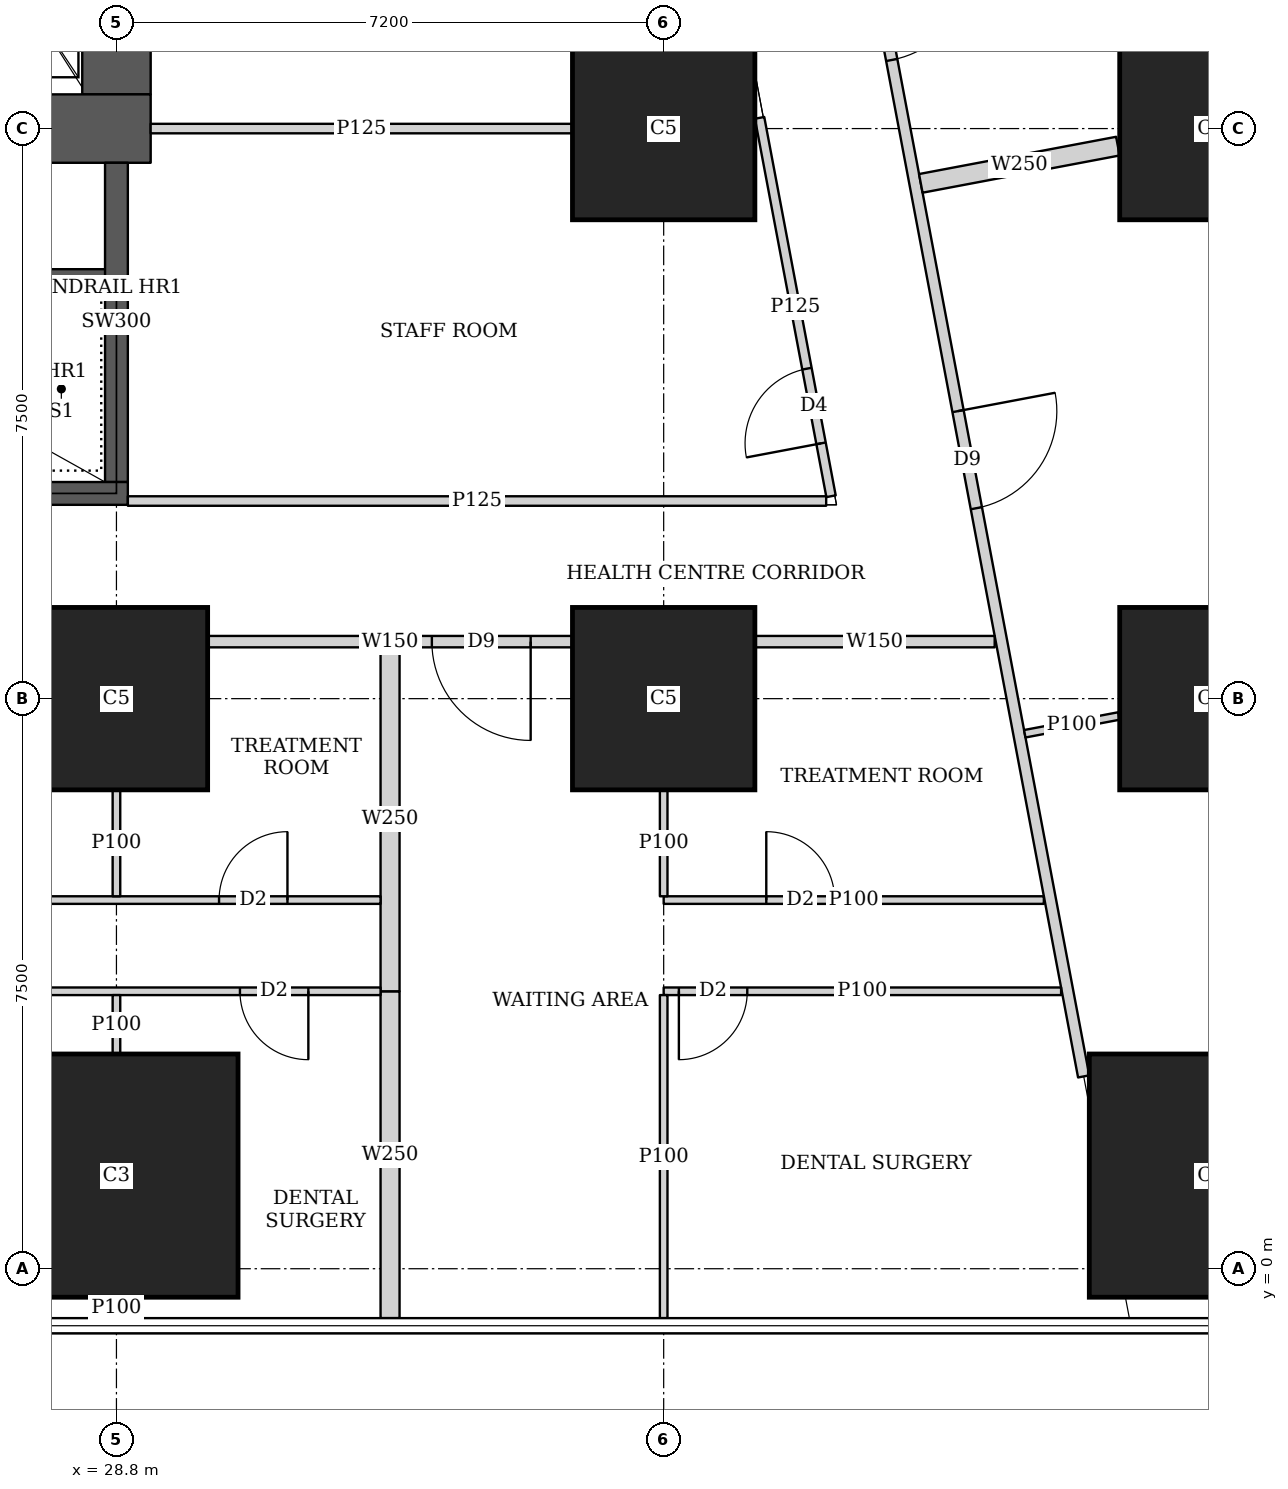
"""IFC4 building model, lengths in metres.
Left out: names, types, materials, properties, quantities, classifications, styles, units other than length and angle.
Written with IfcOpenShell. Run it as: python <this file> out.ifc"""

import sys

from ifc_helpers import new_model, si_unit, direction, frame, frame_2d, origin, origin_2d, place, context, subcontext, project, spatial, rectangle, extrude, element, fill, save


model = new_model("IFC4")
c1 = context("Model", 3, precision=1e-05, world=origin(), true_north=direction((0.0, 1.0)))
c2 = subcontext(c1, "Body", "Model", "MODEL_VIEW")
j1 = project(units=[si_unit("LENGTHUNIT", "METRE"), si_unit("PLANEANGLEUNIT", "RADIAN")], contexts=[c1])
p1 = place(None, origin())
s1 = spatial("IfcSite", under=j1, at=p1, CompositionType="ELEMENT")
p2 = place(p1, origin())
s2 = spatial("IfcBuilding", under=s1, at=p2, CompositionType="ELEMENT")
p3 = place(p2, frame((0.0, 0.0, 10.1)))
s3 = spatial("IfcBuildingStorey", under=s2, at=p3, CompositionType="ELEMENT", Elevation=10.1)
for number, where, z_axis, x_axis in (
    (1, (28.8, 1.225, 0.0), (0.0, 0.0, 1.0), (1.0, 0.0, 0.0)),
    (2, (43.2, 1.225, 0.0), (0.0, 0.0, 1.0), (1.0, 0.0, 0.0)),
):
    element("IfcColumn", number, at=place(p3, frame(where, z_axis=z_axis, x_axis=x_axis)), inside=s3, PredefinedType="COLUMN", context=c2, shape_type="SweptSolid", body=[
        extrude(rectangle(XDim=3.2, YDim=3.2, at=origin_2d()), origin(), (0.0, 0.0, 1.0), 4.5),
    ])
for number, where, z_axis, x_axis in (
    (3, (28.8, 7.5, 0.0), (0.0, 0.0, 1.0), (1.0, 0.0, 0.0)),
    (4, (36.0, 7.5, 0.0), (0.0, 0.0, 1.0), (1.0, 0.0, 0.0)),
    (5, (43.2, 7.5, 0.0), (0.0, 0.0, 1.0), (1.0, 0.0, 0.0)),
    (6, (36.0, 15.0, 0.0), (0.0, 0.0, 1.0), (1.0, 0.0, 0.0)),
    (7, (43.2, 15.0, 0.0), (0.0, 0.0, 1.0), (1.0, 0.0, 0.0)),
):
    element("IfcColumn", number, at=place(p3, frame(where, z_axis=z_axis, x_axis=x_axis)), inside=s3, PredefinedType="COLUMN", context=c2, shape_type="SweptSolid", body=[
        extrude(rectangle(XDim=2.4, YDim=2.4, at=origin_2d()), origin(), (0.0, 0.0, 1.0), 4.5),
    ])
p4 = place(p3, frame((13.95, 15.0, 0.0), z_axis=(0.0, 0.0, 1.0), x_axis=(1.0, 0.0, 0.0)))
e8 = element("IfcWall", 8, at=p4, inside=s3, PredefinedType="SHEAR", context=c2, shape_type="SweptSolid", body=[
    extrude(rectangle(XDim=15.3, YDim=0.9, at=frame_2d((7.65, 0.0))), origin(), (0.0, 0.0, 1.0), 4.5),
])
p5 = place(p4, frame((4.45, 0.0, 0.0)))
e9 = element("IfcOpeningElement", 9, at=p5, cuts=e8, PredefinedType="OPENING", context=c2, shape_type="SweptSolid", body=[
    extrude(rectangle(XDim=1.8, YDim=2.1, at=frame_2d((0.9, 1.05))), frame((0.0, 0.46, 0.0), z_axis=(0.0, -1.0, 0.0), x_axis=(1.0, 0.0, 0.0)), (0.0, 0.0, 1.0), 0.92),
])
p6 = place(p4, frame((10.7, 0.0, 0.0)))
e10 = element("IfcOpeningElement", 10, at=p6, cuts=e8, PredefinedType="OPENING", context=c2, shape_type="SweptSolid", body=[
    extrude(rectangle(XDim=1.1, YDim=2.1, at=frame_2d((0.55, 1.05))), frame((0.0, 0.46, 0.0), z_axis=(0.0, -1.0, 0.0), x_axis=(1.0, 0.0, 0.0)), (0.0, 0.0, 1.0), 0.92),
])
p7 = place(p3, frame((28.8, 15.45, 0.0), z_axis=(0.0, 0.0, 1.0), x_axis=(0.0, 1.0, 0.0)))
e11 = element("IfcWall", 11, at=p7, inside=s3, PredefinedType="SHEAR", context=c2, shape_type="SweptSolid", body=[
    extrude(rectangle(XDim=14.1, YDim=0.9, at=frame_2d((7.05, 0.0))), origin(), (0.0, 0.0, 1.0), 4.5),
])
p8 = place(p3, frame((21.45, 10.2, 0.0), z_axis=(0.0, 0.0, 1.0), x_axis=(1.0, 0.0, 0.0)))
e12 = element("IfcWall", 12, at=p8, inside=s3, PredefinedType="SHEAR", context=c2, shape_type="SweptSolid", body=[
    extrude(rectangle(XDim=7.5, YDim=0.3, at=frame_2d((3.75, 0.0))), origin(), (0.0, 0.0, 1.0), 4.5),
])
p9 = place(p8, frame((0.5, 0.0, 0.0)))
e13 = element("IfcOpeningElement", 13, at=p9, cuts=e12, PredefinedType="OPENING", context=c2, shape_type="SweptSolid", body=[
    extrude(rectangle(XDim=1.1, YDim=2.1, at=frame_2d((0.55, 1.05))), frame((0.0, 0.16, 0.0), z_axis=(0.0, -1.0, 0.0), x_axis=(1.0, 0.0, 0.0)), (0.0, 0.0, 1.0), 0.32),
])
p10 = place(p3, frame((28.8, 10.35, 0.0), z_axis=(0.0, 0.0, 1.0), x_axis=(0.0, 1.0, 0.0)))
e14 = element("IfcWall", 14, at=p10, inside=s3, PredefinedType="SHEAR", context=c2, shape_type="SweptSolid", body=[
    extrude(rectangle(XDim=4.2, YDim=0.3, at=frame_2d((2.1, 0.0))), origin(), (0.0, 0.0, 1.0), 4.5),
])
p11 = place(p3, frame((40.355, 8.25, 0.0), z_axis=(0.0, 0.0, 1.0), x_axis=(-1.0, 0.0, 0.0)))
e15 = element("IfcWall", 15, at=p11, inside=s3, PredefinedType="SOLIDWALL", context=c2, shape_type="SweptSolid", body=[
    extrude(rectangle(XDim=3.154, YDim=0.15, at=frame_2d((1.577, 0.0))), origin(), (0.0, 0.0, 1.0), 2.6),
])
p12 = place(p3, frame((34.799, 8.25, 0.0), z_axis=(0.0, 0.0, 1.0), x_axis=(-1.0, 0.0, 0.0)))
e16 = element("IfcWall", 16, at=p12, inside=s3, PredefinedType="SOLIDWALL", context=c2, shape_type="SweptSolid", body=[
    extrude(rectangle(XDim=4.798, YDim=0.15, at=frame_2d((2.399, 0.0))), origin(), (0.0, 0.0, 1.0), 2.6),
])
p13 = place(p12, frame((0.549, 0.0, 0.0)))
e17 = element("IfcOpeningElement", 17, at=p13, cuts=e16, PredefinedType="OPENING", context=c2, shape_type="SweptSolid", body=[
    extrude(rectangle(XDim=1.3, YDim=2.1, at=frame_2d((0.65, 1.05))), frame((0.0, 0.085, 0.0), z_axis=(0.0, -1.0, 0.0), x_axis=(1.0, 0.0, 0.0)), (0.0, 0.0, 1.0), 0.17),
])
p14 = place(p3, frame((35.151, 36.285, 0.0), z_axis=(0.0, 0.0, 1.0), x_axis=(0.18558085056, -0.982628998099, 0.0)))
e18 = element("IfcWall", 18, at=p14, inside=s3, PredefinedType="SOLIDWALL", context=c2, shape_type="SweptSolid", body=[
    extrude(rectangle(XDim=34.352, YDim=0.15, at=frame_2d((17.176, 0.0))), origin(), (0.0, 0.0, 1.0), 2.4),
])
p15 = place(p14, frame((13.189, 0.0, 0.0)))
e19 = element("IfcOpeningElement", 19, at=p15, cuts=e18, PredefinedType="OPENING", context=c2, shape_type="SweptSolid", body=[
    extrude(rectangle(XDim=1.3, YDim=2.1, at=frame_2d((0.65, 1.05))), frame((0.0, 0.085, 0.0), z_axis=(0.0, -1.0, 0.0), x_axis=(1.0, 0.0, 0.0)), (0.0, 0.0, 1.0), 0.17),
])
p16 = place(p14, frame((19.443, 0.0, 0.0)))
e20 = element("IfcOpeningElement", 20, at=p16, cuts=e18, PredefinedType="OPENING", context=c2, shape_type="SweptSolid", body=[
    extrude(rectangle(XDim=1.3, YDim=2.1, at=frame_2d((0.65, 1.05))), frame((0.0, 0.085, 0.0), z_axis=(0.0, -1.0, 0.0), x_axis=(1.0, 0.0, 0.0)), (0.0, 0.0, 1.0), 0.17),
])
p17 = place(p14, frame((25.444, 0.0, 0.0)))
e21 = element("IfcOpeningElement", 21, at=p17, cuts=e18, PredefinedType="OPENING", context=c2, shape_type="SweptSolid", body=[
    extrude(rectangle(XDim=1.3, YDim=2.1, at=frame_2d((0.65, 1.05))), frame((0.0, 0.085, 0.0), z_axis=(0.0, -1.0, 0.0), x_axis=(1.0, 0.0, 0.0)), (0.0, 0.0, 1.0), 0.17),
])
p18 = place(p3, frame((32.275, 3.65, 0.0), z_axis=(0.0, 0.0, 1.0), x_axis=(-1.0, 0.0, 0.0)))
e22 = element("IfcWall", 22, at=p18, inside=s3, PredefinedType="PARTITIONING", context=c2, shape_type="SweptSolid", body=[
    extrude(rectangle(XDim=10.675, YDim=0.1, at=frame_2d((5.337, 0.0))), origin(), (0.0, 0.0, 1.0), 2.6),
])
p19 = place(p18, frame((9.575, 0.0, 0.0)))
e23 = element("IfcOpeningElement", 23, at=p19, cuts=e22, PredefinedType="OPENING", context=c2, shape_type="SweptSolid", body=[
    extrude(rectangle(XDim=0.9, YDim=2.1, at=frame_2d((0.45, 1.05))), frame((0.0, 0.06, 0.0), z_axis=(0.0, -1.0, 0.0), x_axis=(1.0, 0.0, 0.0)), (0.0, 0.0, 1.0), 0.12),
])
p20 = place(p18, frame((0.95, 0.0, 0.0)))
e24 = element("IfcOpeningElement", 24, at=p20, cuts=e22, PredefinedType="OPENING", context=c2, shape_type="SweptSolid", body=[
    extrude(rectangle(XDim=0.9, YDim=2.1, at=frame_2d((0.45, 1.05))), frame((0.0, 0.06, 0.0), z_axis=(0.0, -1.0, 0.0), x_axis=(1.0, 0.0, 0.0)), (0.0, 0.0, 1.0), 0.12),
])
p21 = place(p3, frame((32.275, 4.85, 0.0), z_axis=(0.0, 0.0, 1.0), x_axis=(-1.0, 0.0, 0.0)))
e25 = element("IfcWall", 25, at=p21, inside=s3, PredefinedType="PARTITIONING", context=c2, shape_type="SweptSolid", body=[
    extrude(rectangle(XDim=10.675, YDim=0.1, at=frame_2d((5.337, 0.0))), origin(), (0.0, 0.0, 1.0), 2.6),
])
p22 = place(p21, frame((8.425, 0.0, 0.0)))
e26 = element("IfcOpeningElement", 26, at=p22, cuts=e25, PredefinedType="OPENING", context=c2, shape_type="SweptSolid", body=[
    extrude(rectangle(XDim=0.9, YDim=2.1, at=frame_2d((0.45, 1.05))), frame((0.0, 0.06, 0.0), z_axis=(0.0, -1.0, 0.0), x_axis=(1.0, 0.0, 0.0)), (0.0, 0.0, 1.0), 0.12),
])
p23 = place(p21, frame((4.825, 0.0, 0.0)))
e27 = element("IfcOpeningElement", 27, at=p23, cuts=e25, PredefinedType="OPENING", context=c2, shape_type="SweptSolid", body=[
    extrude(rectangle(XDim=0.9, YDim=2.1, at=frame_2d((0.45, 1.05))), frame((0.0, 0.06, 0.0), z_axis=(0.0, -1.0, 0.0), x_axis=(1.0, 0.0, 0.0)), (0.0, 0.0, 1.0), 0.12),
])
p24 = place(p21, frame((1.225, 0.0, 0.0)))
e28 = element("IfcOpeningElement", 28, at=p24, cuts=e25, PredefinedType="OPENING", context=c2, shape_type="SweptSolid", body=[
    extrude(rectangle(XDim=0.9, YDim=2.1, at=frame_2d((0.45, 1.05))), frame((0.0, 0.06, 0.0), z_axis=(0.0, -1.0, 0.0), x_axis=(1.0, 0.0, 0.0)), (0.0, 0.0, 1.0), 0.12),
])
p25 = place(p3, frame((28.8, -0.65, 0.0), z_axis=(0.0, 0.0, 1.0), x_axis=(0.0, 1.0, 0.0)))
e29 = element("IfcWall", 29, at=p25, inside=s3, PredefinedType="PARTITIONING", context=c2, shape_type="SweptSolid", body=[
    extrude(rectangle(XDim=0.274, YDim=0.1, at=frame_2d((0.137, 0.0))), origin(), (0.0, 0.0, 1.0), 4.2),
])
p26 = place(p3, frame((28.8, 2.826, 0.0), z_axis=(0.0, 0.0, 1.0), x_axis=(0.0, 1.0, 0.0)))
e30 = element("IfcWall", 30, at=p26, inside=s3, PredefinedType="PARTITIONING", context=c2, shape_type="SweptSolid", body=[
    extrude(rectangle(XDim=0.774, YDim=0.1, at=frame_2d((0.387, 0.0))), origin(), (0.0, 0.0, 1.0), 2.6),
])
p27 = place(p3, frame((28.8, 4.9, 0.0), z_axis=(0.0, 0.0, 1.0), x_axis=(0.0, 1.0, 0.0)))
e31 = element("IfcWall", 31, at=p27, inside=s3, PredefinedType="PARTITIONING", context=c2, shape_type="SweptSolid", body=[
    extrude(rectangle(XDim=1.399, YDim=0.1, at=frame_2d((0.7, 0.0))), origin(), (0.0, 0.0, 1.0), 2.6),
])
p28 = place(p3, frame((41.229, 3.65, 0.0), z_axis=(0.0, 0.0, 1.0), x_axis=(-1.0, 0.0, 0.0)))
e32 = element("IfcWall", 32, at=p28, inside=s3, PredefinedType="PARTITIONING", context=c2, shape_type="SweptSolid", body=[
    extrude(rectangle(XDim=5.229, YDim=0.1, at=frame_2d((2.615, 0.0))), origin(), (0.0, 0.0, 1.0), 4.2),
])
p29 = place(p28, frame((4.129, 0.0, 0.0)))
e33 = element("IfcOpeningElement", 33, at=p29, cuts=e32, PredefinedType="OPENING", context=c2, shape_type="SweptSolid", body=[
    extrude(rectangle(XDim=0.9, YDim=2.1, at=frame_2d((0.45, 1.05))), frame((0.0, 0.06, 0.0), z_axis=(0.0, -1.0, 0.0), x_axis=(1.0, 0.0, 0.0)), (0.0, 0.0, 1.0), 0.12),
])
p30 = place(p3, frame((41.002, 4.85, 0.0), z_axis=(0.0, 0.0, 1.0), x_axis=(-1.0, 0.0, 0.0)))
e34 = element("IfcWall", 34, at=p30, inside=s3, PredefinedType="PARTITIONING", context=c2, shape_type="SweptSolid", body=[
    extrude(rectangle(XDim=5.002, YDim=0.1, at=frame_2d((2.501, 0.0))), origin(), (0.0, 0.0, 1.0), 4.2),
])
p31 = place(p30, frame((2.752, 0.0, 0.0)))
e35 = element("IfcOpeningElement", 35, at=p31, cuts=e34, PredefinedType="OPENING", context=c2, shape_type="SweptSolid", body=[
    extrude(rectangle(XDim=0.9, YDim=2.1, at=frame_2d((0.45, 1.05))), frame((0.0, 0.06, 0.0), z_axis=(0.0, -1.0, 0.0), x_axis=(1.0, 0.0, 0.0)), (0.0, 0.0, 1.0), 0.12),
])
p32 = place(p3, frame((36.0, -0.65, 0.0), z_axis=(0.0, 0.0, 1.0), x_axis=(0.0, 1.0, 0.0)))
e36 = element("IfcWall", 36, at=p32, inside=s3, PredefinedType="PARTITIONING", context=c2, shape_type="SweptSolid", body=[
    extrude(rectangle(XDim=4.25, YDim=0.1, at=frame_2d((2.125, 0.0))), origin(), (0.0, 0.0, 1.0), 2.4),
])
p33 = place(p3, frame((36.0, 4.9, 0.0), z_axis=(0.0, 0.0, 1.0), x_axis=(0.0, 1.0, 0.0)))
e37 = element("IfcWall", 37, at=p33, inside=s3, PredefinedType="PARTITIONING", context=c2, shape_type="SweptSolid", body=[
    extrude(rectangle(XDim=1.399, YDim=0.1, at=frame_2d((0.7, 0.0))), origin(), (0.0, 0.0, 1.0), 4.2),
])
p34 = place(p3, frame((32.4, -0.65, 0.0), z_axis=(0.0, 0.0, 1.0), x_axis=(0.0, 1.0, 0.0)))
e38 = element("IfcWall", 38, at=p34, inside=s3, PredefinedType="SOLIDWALL", context=c2, shape_type="SweptSolid", body=[
    extrude(rectangle(XDim=4.3, YDim=0.25, at=frame_2d((2.15, 0.0))), origin(), (0.0, 0.0, 1.0), 2.4),
])
p35 = place(p3, frame((32.4, 3.65, 0.0), z_axis=(0.0, 0.0, 1.0), x_axis=(0.0, 1.0, 0.0)))
e39 = element("IfcWall", 39, at=p35, inside=s3, PredefinedType="SOLIDWALL", context=c2, shape_type="SweptSolid", body=[
    extrude(rectangle(XDim=4.525, YDim=0.25, at=frame_2d((2.263, 0.0))), origin(), (0.0, 0.0, 1.0), 2.6),
])
p36 = place(p3, frame((41.99, 7.272, 0.0), z_axis=(0.0, 0.0, 1.0), x_axis=(-0.982645675559, -0.185492523583, 0.0)))
e40 = element("IfcWall", 40, at=p36, inside=s3, PredefinedType="PARTITIONING", context=c2, shape_type="SweptSolid", body=[
    extrude(rectangle(XDim=1.261, YDim=0.1, at=frame_2d((0.63, 0.0))), origin(), (0.0, 0.0, 1.0), 2.6),
])
p37 = place(p3, frame((41.976, 14.769, 0.0), z_axis=(0.0, 0.0, 1.0), x_axis=(-0.982610412957, -0.185679229715, 0.0)))
e41 = element("IfcWall", 41, at=p37, inside=s3, PredefinedType="SOLIDWALL", context=c2, shape_type="SweptSolid", body=[
    extrude(rectangle(XDim=2.639, YDim=0.25, at=frame_2d((1.319, 0.0))), origin(), (0.0, 0.0, 1.0), 2.6),
])
p38 = place(p3, frame((28.95, 10.1, 0.0), z_axis=(0.0, 0.0, 1.0), x_axis=(1.0, 0.0, 0.0)))
e42 = element("IfcWall", 42, at=p38, inside=s3, PredefinedType="PARTITIONING", context=c2, shape_type="SweptSolid", body=[
    extrude(rectangle(XDim=9.188, YDim=0.125, at=frame_2d((4.594, 0.0))), origin(), (0.0, 0.0, 1.0), 2.2),
])
p39 = place(p3, frame((38.202, 10.163, 0.0), z_axis=(0.0, 0.0, 1.0), x_axis=(-0.185539561605, 0.982636795097, 0.0)))
e43 = element("IfcWall", 43, at=p39, inside=s3, PredefinedType="PARTITIONING", context=c2, shape_type="SweptSolid", body=[
    extrude(rectangle(XDim=5.066, YDim=0.125, at=frame_2d((2.533, 0.0))), origin(), (0.0, 0.0, 1.0), 2.6),
])
p40 = place(p39, frame((0.708, 0.0, 0.0)))
e44 = element("IfcOpeningElement", 44, at=p40, cuts=e43, PredefinedType="OPENING", context=c2, shape_type="SweptSolid", body=[
    extrude(rectangle(XDim=1.0, YDim=2.1, at=frame_2d((0.5, 1.05))), frame((0.0, 0.073, 0.0), z_axis=(0.0, -1.0, 0.0), x_axis=(1.0, 0.0, 0.0)), (0.0, 0.0, 1.0), 0.145),
])
p41 = place(p3, frame((29.25, 15.0, 0.0), z_axis=(0.0, 0.0, 1.0), x_axis=(1.0, 0.0, 0.0)))
e45 = element("IfcWall", 45, at=p41, inside=s3, PredefinedType="PARTITIONING", context=c2, shape_type="SweptSolid", body=[
    extrude(rectangle(XDim=5.549, YDim=0.125, at=frame_2d((2.774, 0.0))), origin(), (0.0, 0.0, 1.0), 4.2),
])
p42 = place(p3, frame((23.0, 13.05, 0.0), z_axis=(0.0, 0.0, 1.0), x_axis=(1.0, 0.0, 0.0)))
e46 = element("IfcWall", 46, at=p42, inside=s3, PredefinedType="SHEAR", context=c2, shape_type="SweptSolid", body=[
    extrude(rectangle(XDim=5.8, YDim=0.2, at=frame_2d((2.9, 0.0))), origin(), (0.0, 0.0, 1.0), 4.5),
])
p43 = place(p20, origin())
e47 = element("IfcDoor", 47, at=p43, inside=s3, OperationType="SINGLE_SWING_LEFT", PredefinedType="DOOR", context=c2, shape_type="SweptSolid", body=[
    extrude(rectangle(XDim=0.9, YDim=2.1, at=frame_2d((0.45, 1.05))), frame((0.0, 0.025, 0.0), z_axis=(0.0, -1.0, 0.0), x_axis=(1.0, 0.0, 0.0)), (0.0, 0.0, 1.0), 0.05),
])
fill(e24, e47)
p44 = place(p24, origin())
e48 = element("IfcDoor", 48, at=p44, inside=s3, OperationType="SINGLE_SWING_RIGHT", PredefinedType="DOOR", context=c2, shape_type="SweptSolid", body=[
    extrude(rectangle(XDim=0.9, YDim=2.1, at=frame_2d((0.45, 1.05))), frame((0.0, 0.025, 0.0), z_axis=(0.0, -1.0, 0.0), x_axis=(1.0, 0.0, 0.0)), (0.0, 0.0, 1.0), 0.05),
])
fill(e28, e48)
p45 = place(p29, origin())
e49 = element("IfcDoor", 49, at=p45, inside=s3, OperationType="SINGLE_SWING_RIGHT", PredefinedType="DOOR", context=c2, shape_type="SweptSolid", body=[
    extrude(rectangle(XDim=0.9, YDim=2.1, at=frame_2d((0.45, 1.05))), frame((0.0, 0.025, 0.0), z_axis=(0.0, -1.0, 0.0), x_axis=(1.0, 0.0, 0.0)), (0.0, 0.0, 1.0), 0.05),
])
fill(e33, e49)
p46 = place(p31, origin())
e50 = element("IfcDoor", 50, at=p46, inside=s3, OperationType="SINGLE_SWING_LEFT", PredefinedType="DOOR", context=c2, shape_type="SweptSolid", body=[
    extrude(rectangle(XDim=0.9, YDim=2.1, at=frame_2d((0.45, 1.05))), frame((0.0, 0.025, 0.0), z_axis=(0.0, -1.0, 0.0), x_axis=(1.0, 0.0, 0.0)), (0.0, 0.0, 1.0), 0.05),
])
fill(e35, e50)
p47 = place(p13, origin())
e51 = element("IfcDoor", 51, at=p47, inside=s3, OperationType="DOUBLE_DOOR_SINGLE_SWING", PredefinedType="DOOR", context=c2, shape_type="SweptSolid", body=[
    extrude(rectangle(XDim=1.3, YDim=2.1, at=frame_2d((0.65, 1.05))), frame((0.0, 0.025, 0.0), z_axis=(0.0, -1.0, 0.0), x_axis=(1.0, 0.0, 0.0)), (0.0, 0.0, 1.0), 0.05),
])
fill(e17, e51)
p48 = place(p16, origin())
e52 = element("IfcDoor", 52, at=p48, inside=s3, OperationType="DOUBLE_DOOR_SINGLE_SWING", PredefinedType="DOOR", context=c2, shape_type="SweptSolid", body=[
    extrude(rectangle(XDim=1.3, YDim=2.1, at=frame_2d((0.65, 1.05))), frame((0.0, 0.025, 0.0), z_axis=(0.0, -1.0, 0.0), x_axis=(1.0, 0.0, 0.0)), (0.0, 0.0, 1.0), 0.05),
])
fill(e20, e52)
p49 = place(p17, origin())
e53 = element("IfcDoor", 53, at=p49, inside=s3, OperationType="DOUBLE_DOOR_SINGLE_SWING", PredefinedType="DOOR", context=c2, shape_type="SweptSolid", body=[
    extrude(rectangle(XDim=1.3, YDim=2.1, at=frame_2d((0.65, 1.05))), frame((0.0, 0.025, 0.0), z_axis=(0.0, -1.0, 0.0), x_axis=(1.0, 0.0, 0.0)), (0.0, 0.0, 1.0), 0.05),
])
fill(e21, e53)
p50 = place(p40, origin())
e54 = element("IfcDoor", 54, at=p50, inside=s3, OperationType="SINGLE_SWING_LEFT", PredefinedType="DOOR", context=c2, shape_type="SweptSolid", body=[
    extrude(rectangle(XDim=1.0, YDim=2.1, at=frame_2d((0.5, 1.05))), frame((0.0, 0.025, 0.0), z_axis=(0.0, -1.0, 0.0), x_axis=(1.0, 0.0, 0.0)), (0.0, 0.0, 1.0), 0.05),
])
fill(e44, e54)
save(model, sys.argv[1])
